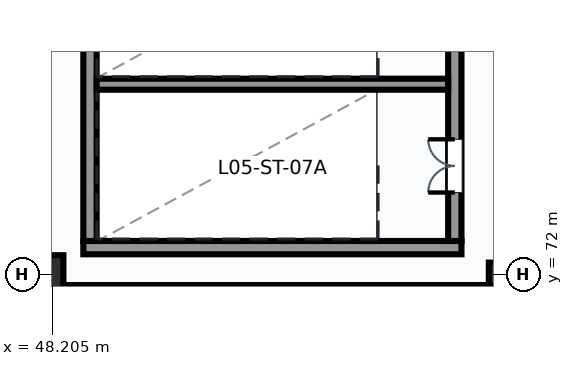
"""IFC4 building model, lengths in metres.
Left out: names, types, materials, properties, quantities, classifications, styles, units other than length and angle.
Written with IfcOpenShell. Run it as: python <this file> out.ifc"""

import sys

from ifc_helpers import new_model, si_unit, direction, frame, frame_2d, origin, origin_2d, place, context, subcontext, project, spatial, rectangle, hollow_circle, extrude, element, fill, save


model = new_model("IFC4")
c1 = context("Model", 3, precision=1e-05, world=origin(), true_north=direction((0.0, 1.0)))
c2 = subcontext(c1, "Body", "Model", "MODEL_VIEW")
j1 = project(units=[si_unit("LENGTHUNIT", "METRE"), si_unit("PLANEANGLEUNIT", "RADIAN")], contexts=[c1])
p1 = place(None, origin())
s1 = spatial("IfcSite", under=j1, at=p1, CompositionType="ELEMENT")
p2 = place(p1, origin())
s2 = spatial("IfcBuilding", under=s1, at=p2, CompositionType="ELEMENT")
p3 = place(p2, frame((0.0, 0.0, 24.6)))
s3 = spatial("IfcBuildingStorey", under=s2, at=p3, CompositionType="ELEMENT", Elevation=24.6)
p4 = place(p3, frame((48.0, 72.0, 0.0), z_axis=(0.0, 0.0, 1.0), x_axis=(1.0, 0.0, 0.0)))
e1 = element("IfcColumn", 1, at=p4, inside=s3, PredefinedType="COLUMN", context=c2, shape_type="SweptSolid", body=[
    extrude(rectangle(XDim=1.0, YDim=1.0, at=origin_2d()), origin(), (0.0, 0.0, 1.0), 4.8),
])
p5 = place(p3, frame((60.0, 72.0, 0.0), z_axis=(0.0, 0.0, 1.0), x_axis=(1.0, 0.0, 0.0)))
e2 = element("IfcColumn", 2, at=p5, inside=s3, PredefinedType="COLUMN", context=c2, shape_type="SweptSolid", body=[
    extrude(hollow_circle(Radius=0.305, WallThickness=0.025, at=origin_2d()), origin(), (0.0, 0.0, 1.0), 4.8),
])
p6 = place(p3, frame((49.025, 72.7, 0.0), z_axis=(0.0, 0.0, 1.0), x_axis=(1.0, 0.0, 0.0)))
e3 = element("IfcWall", 3, at=p6, inside=s3, PredefinedType="SHEAR", context=c2, shape_type="SweptSolid", body=[
    extrude(rectangle(XDim=9.95, YDim=0.35, at=frame_2d((4.975, 0.0))), origin(), (0.0, 0.0, 1.0), 4.8),
])
p7 = place(p3, frame((49.2, 72.875, 0.0), z_axis=(0.0, 0.0, 1.0), x_axis=(0.0, 1.0, 0.0)))
e4 = element("IfcWall", 4, at=p7, inside=s3, PredefinedType="SHEAR", context=c2, shape_type="SweptSolid", body=[
    extrude(rectangle(XDim=8.25, YDim=0.35, at=frame_2d((4.125, 0.0))), origin(), (0.0, 0.0, 1.0), 4.8),
])
p8 = place(p3, frame((58.8, 72.875, 0.0), z_axis=(0.0, 0.0, 1.0), x_axis=(0.0, 1.0, 0.0)))
e5 = element("IfcWall", 5, at=p8, inside=s3, PredefinedType="SHEAR", context=c2, shape_type="SweptSolid", body=[
    extrude(rectangle(XDim=8.25, YDim=0.35, at=frame_2d((4.125, 0.0))), origin(), (0.0, 0.0, 1.0), 4.8),
])
p9 = place(p8, frame((1.275, 0.0, 0.0)))
e6 = element("IfcOpeningElement", 6, at=p9, cuts=e5, PredefinedType="OPENING", context=c2, shape_type="SweptSolid", body=[
    extrude(rectangle(XDim=1.4, YDim=2.2, at=frame_2d((0.7, 1.1))), frame((0.0, 0.185, 0.0), z_axis=(0.0, -1.0, 0.0), x_axis=(1.0, 0.0, 0.0)), (0.0, 0.0, 1.0), 0.37),
])
p10 = place(p8, frame((5.615, 0.0, 0.0)))
e7 = element("IfcOpeningElement", 7, at=p10, cuts=e5, PredefinedType="OPENING", context=c2, shape_type="SweptSolid", body=[
    extrude(rectangle(XDim=1.32, YDim=2.2, at=frame_2d((0.66, 1.1))), frame((0.0, 0.185, 0.0), z_axis=(0.0, -1.0, 0.0), x_axis=(1.0, 0.0, 0.0)), (0.0, 0.0, 1.0), 0.37),
])
p11 = place(p3, frame((49.375, 77.0, 0.0), z_axis=(0.0, 0.0, 1.0), x_axis=(1.0, 0.0, 0.0)))
e8 = element("IfcWall", 8, at=p11, inside=s3, PredefinedType="SHEAR", context=c2, shape_type="SweptSolid", body=[
    extrude(rectangle(XDim=9.25, YDim=0.29, at=frame_2d((4.625, 0.0))), origin(), (0.0, 0.0, 1.0), 4.8),
])
p12 = place(p3, frame((48.6, 71.6, 0.0), z_axis=(0.0, 0.0, 1.0), x_axis=(1.0, 0.0, 0.0)))
e9 = element("IfcWall", 9, at=p12, inside=s3, PredefinedType="SOLIDWALL", context=c2, shape_type="SweptSolid", body=[
    extrude(rectangle(XDim=24.4, YDim=0.23, at=frame_2d((12.2, 0.0))), origin(), (0.0, 0.0, 1.0), 4.58),
])
p13 = place(p9, origin())
e10 = element("IfcDoor", 10, at=p13, inside=s3, OperationType="DOUBLE_DOOR_SINGLE_SWING", PredefinedType="DOOR", context=c2, shape_type="SweptSolid", body=[
    extrude(rectangle(XDim=1.4, YDim=2.2, at=frame_2d((0.7, 1.1))), frame((0.0, 0.025, 0.0), z_axis=(0.0, -1.0, 0.0), x_axis=(1.0, 0.0, 0.0)), (0.0, 0.0, 1.0), 0.05),
])
fill(e6, e10)
save(model, sys.argv[1])
